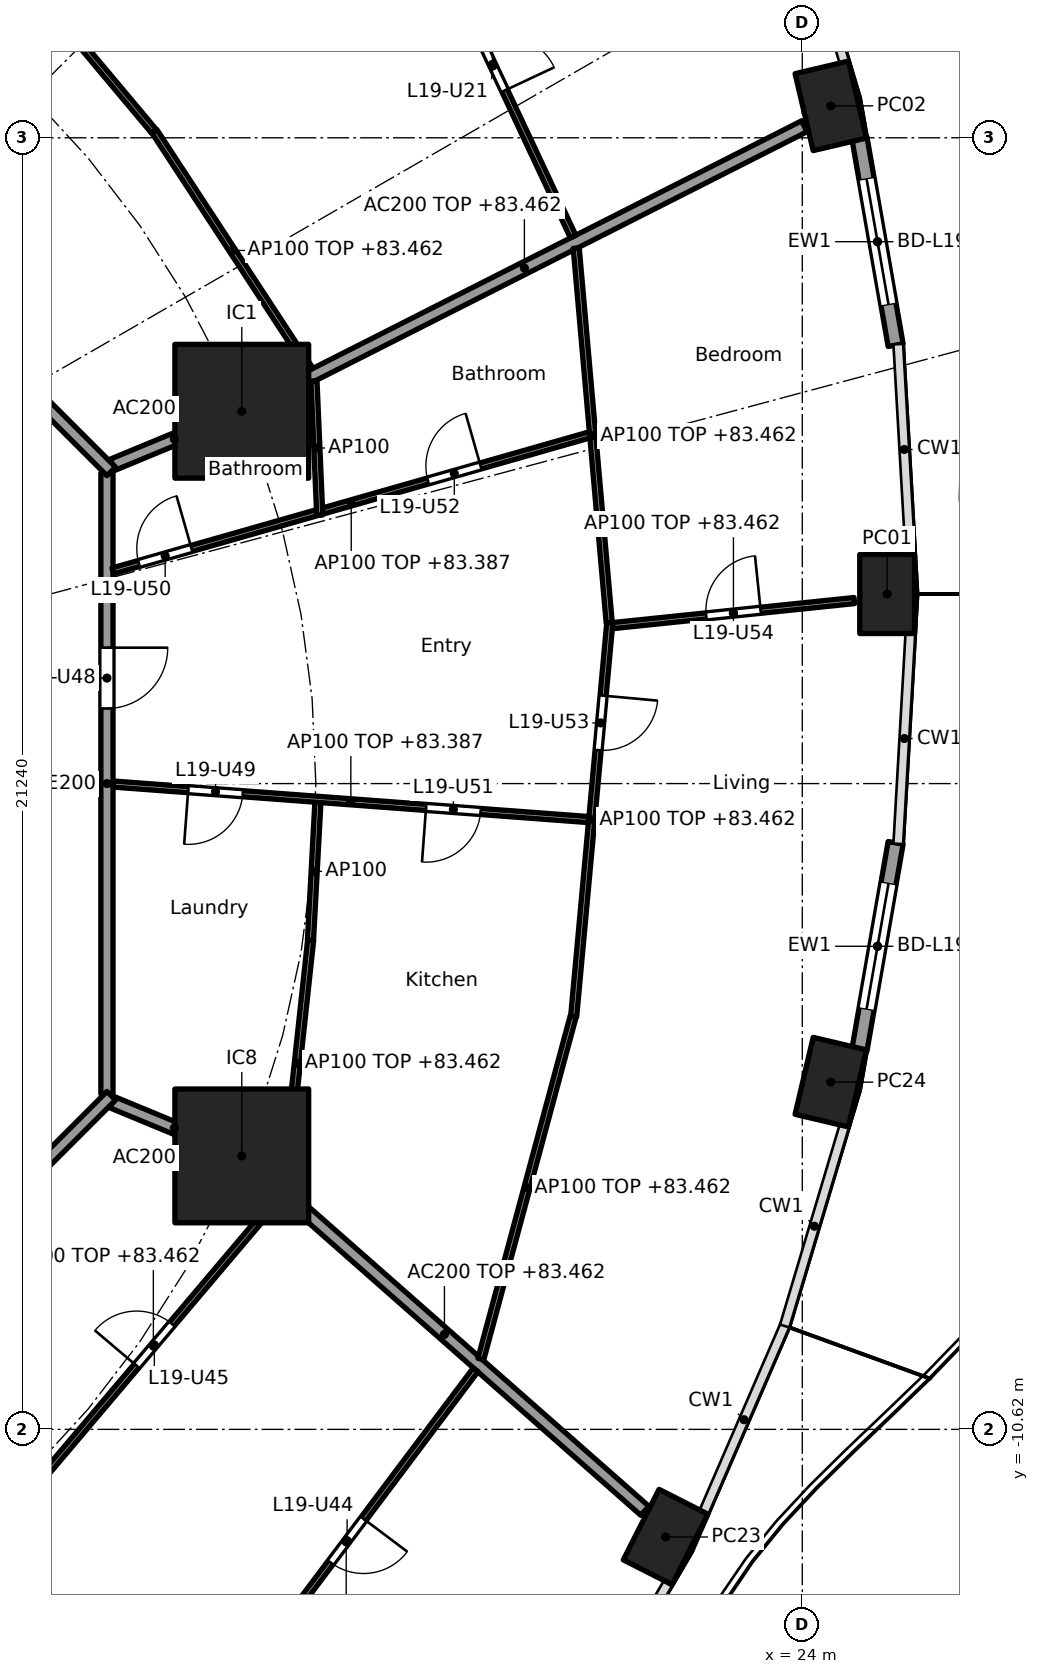
"""IFC4 building model, lengths in metres.
Left out: names, types, materials, properties, quantities, classifications, styles, units other than length and angle.
Written with IfcOpenShell. Run it as: python <this file> out.ifc"""

import sys

from ifc_helpers import new_model, si_unit, direction, frame, frame_2d, origin, origin_2d, place, context, subcontext, project, spatial, rectangle, hollow_rectangle, extrude, element, fill, save


model = new_model("IFC4")
c1 = context("Model", 3, precision=1e-05, world=origin(), true_north=direction((0.0, 1.0)))
c2 = subcontext(c1, "Body", "Model", "MODEL_VIEW")
j1 = project(units=[si_unit("LENGTHUNIT", "METRE"), si_unit("PLANEANGLEUNIT", "RADIAN")], contexts=[c1])
p1 = place(None, origin())
s1 = spatial("IfcSite", under=j1, at=p1, CompositionType="ELEMENT")
p2 = place(p1, origin())
s2 = spatial("IfcBuilding", under=s1, at=p2, CompositionType="ELEMENT")
p3 = place(p2, frame((0.0, 0.0, 80.7)))
s3 = spatial("IfcBuildingStorey", under=s2, at=p3, CompositionType="ELEMENT", Elevation=80.7)
for number, where, z_axis, x_axis in (
    (1, (25.395, 3.118, 0.0), (0.0, 0.0, 1.0), (0.0, 1.0, 0.0)),
    (2, (24.468, 11.145, 0.0), (0.0, 0.0, 1.0), (-0.229, 0.973, 0.0)),
    (3, (21.751, -12.39, 0.0), (0.0, 0.0, 1.0), (0.452, 0.892, 0.0)),
    (4, (24.468, -4.91, 0.0), (0.0, 0.0, 1.0), (0.229, 0.973, 0.0)),
):
    element("IfcColumn", number, at=place(p3, frame(where, z_axis=z_axis, x_axis=x_axis)), inside=s3, PredefinedType="COLUMN", context=c2, shape_type="SweptSolid", body=[
        extrude(hollow_rectangle(XDim=1.3, YDim=0.9, WallThickness=0.045, at=origin_2d()), origin(), (0.0, 0.0, 1.0), 3.7),
    ])
for number, where, z_axis, x_axis in (
    (5, (14.782, 6.123, 0.0), (0.0, 0.0, 1.0), (1.0, 0.0, 0.0)),
    (6, (14.782, -6.123, 0.0), (0.0, 0.0, 1.0), (1.0, 0.0, 0.0)),
):
    element("IfcColumn", number, at=place(p3, frame(where, z_axis=z_axis, x_axis=x_axis)), inside=s3, PredefinedType="COLUMN", context=c2, shape_type="SweptSolid", body=[
        extrude(rectangle(XDim=2.2, YDim=2.2, at=origin_2d()), origin(), (0.0, 0.0, 1.0), 3.7),
    ])
p4 = place(p3, frame((24.94, 10.613, 0.0), z_axis=(0.0, 0.0, 1.0), x_axis=(0.172164316671, -0.985068245385, 0.0)))
e7 = element("IfcWall", 7, at=p4, inside=s3, PredefinedType="SOLIDWALL", context=c2, shape_type="SweptSolid", body=[
    extrude(rectangle(XDim=3.454, YDim=0.25, at=frame_2d((1.727, 0.0))), origin(), (0.0, 0.0, 1.0), 3.44),
])
p5 = place(p4, frame((0.677, 0.0, 0.0)))
e8 = element("IfcOpeningElement", 8, at=p5, cuts=e7, PredefinedType="OPENING", context=c2, shape_type="SweptSolid", body=[
    extrude(rectangle(XDim=2.1, YDim=2.4, at=frame_2d((1.05, 1.2))), frame((0.0, 0.135, 0.0), z_axis=(0.0, -1.0, 0.0), x_axis=(1.0, 0.0, 0.0)), (0.0, 0.0, 1.0), 0.27),
])
p6 = place(p3, frame((25.535, -0.974, 0.0), z_axis=(0.0, 0.0, 1.0), x_axis=(-0.172164316671, -0.985068245385, 0.0)))
e9 = element("IfcWall", 9, at=p6, inside=s3, PredefinedType="SOLIDWALL", context=c2, shape_type="SweptSolid", body=[
    extrude(rectangle(XDim=3.454, YDim=0.25, at=frame_2d((1.727, 0.0))), origin(), (0.0, 0.0, 1.0), 3.44),
])
p7 = place(p6, frame((0.677, 0.0, 0.0)))
e10 = element("IfcOpeningElement", 10, at=p7, cuts=e9, PredefinedType="OPENING", context=c2, shape_type="SweptSolid", body=[
    extrude(rectangle(XDim=2.1, YDim=2.4, at=frame_2d((1.05, 1.2))), frame((0.0, 0.135, 0.0), z_axis=(0.0, -1.0, 0.0), x_axis=(1.0, 0.0, 0.0)), (0.0, 0.0, 1.0), 0.27),
])
p8 = place(p3, frame((12.657, 5.243, 0.0), z_axis=(0.0, 0.0, 1.0), x_axis=(0.923876145736, 0.382691608661, 0.0)))
e11 = element("IfcWall", 11, at=p8, inside=s3, PredefinedType="PARTITIONING", context=c2, shape_type="SweptSolid", body=[
    extrude(rectangle(XDim=2.2, YDim=0.2, at=frame_2d((1.1, 0.0))), origin(), (0.0, 0.0, 1.0), 3.44),
])
p9 = place(p3, frame((14.827, 6.146, 0.0), z_axis=(0.0, 0.0, 1.0), x_axis=(0.892068075337, 0.451901038906, 0.0)))
e12 = element("IfcWall", 12, at=p9, inside=s3, PredefinedType="PARTITIONING", context=c2, shape_type="SweptSolid", body=[
    extrude(rectangle(XDim=10.32, YDim=0.2, at=frame_2d((5.16, 0.0))), origin(), (0.0, 0.0, 1.0), 2.762),
])
p10 = place(p3, frame((12.657, -5.243, 0.0), z_axis=(0.0, 0.0, 1.0), x_axis=(0.923876145736, -0.382691608661, 0.0)))
e13 = element("IfcWall", 13, at=p10, inside=s3, PredefinedType="PARTITIONING", context=c2, shape_type="SweptSolid", body=[
    extrude(rectangle(XDim=2.2, YDim=0.2, at=frame_2d((1.1, 0.0))), origin(), (0.0, 0.0, 1.0), 3.44),
])
p11 = place(p3, frame((14.82, -6.156, 0.0), z_axis=(0.0, 0.0, 1.0), x_axis=(0.750582231659, -0.660777052808, 0.0)))
e14 = element("IfcWall", 14, at=p11, inside=s3, PredefinedType="PARTITIONING", context=c2, shape_type="SweptSolid", body=[
    extrude(rectangle(XDim=8.781, YDim=0.2, at=frame_2d((4.391, 0.0))), origin(), (0.0, 0.0, 1.0), 2.762),
])
p12 = place(p3, frame((12.565, -5.104, 0.0), z_axis=(0.0, 0.0, 1.0), x_axis=(0.0, 1.0, 0.0)))
e15 = element("IfcWall", 15, at=p12, inside=s3, PredefinedType="PARTITIONING", context=c2, shape_type="SweptSolid", body=[
    extrude(rectangle(XDim=10.209, YDim=0.2, at=frame_2d((5.104, 0.0))), origin(), (0.0, 0.0, 1.0), 3.44),
])
p13 = place(p12, frame((6.339, 0.0, 0.0)))
e16 = element("IfcOpeningElement", 16, at=p13, cuts=e15, PredefinedType="OPENING", context=c2, shape_type="SweptSolid", body=[
    extrude(rectangle(XDim=1.0, YDim=2.1, at=frame_2d((0.5, 1.05))), frame((0.0, 0.11, 0.0), z_axis=(0.0, -1.0, 0.0), x_axis=(1.0, 0.0, 0.0)), (0.0, 0.0, 1.0), 0.22),
])
p14 = place(p3, frame((12.635, 5.134, 0.0), z_axis=(0.0, 0.0, 1.0), x_axis=(-0.707106781187, 0.707106781187, 0.0)))
e17 = element("IfcWall", 17, at=p14, inside=s3, PredefinedType="PARTITIONING", context=c2, shape_type="SweptSolid", body=[
    extrude(rectangle(XDim=10.609, YDim=0.2, at=frame_2d((5.305, 0.0))), origin(), (0.0, 0.0, 1.0), 3.44),
])
p15 = place(p3, frame((5.275, -12.494, 0.0), z_axis=(0.0, 0.0, 1.0), x_axis=(0.707106781187, 0.707106781187, 0.0)))
e18 = element("IfcWall", 18, at=p15, inside=s3, PredefinedType="PARTITIONING", context=c2, shape_type="SweptSolid", body=[
    extrude(rectangle(XDim=10.409, YDim=0.2, at=frame_2d((5.205, 0.0))), origin(), (0.0, 0.0, 1.0), 3.44),
])
p16 = place(p3, frame((20.879, 2.597, 0.0), z_axis=(0.0, 0.0, 1.0), x_axis=(0.994666546694, 0.103142914868, 0.0)))
e19 = element("IfcWall", 19, at=p16, inside=s3, PredefinedType="PARTITIONING", context=c2, shape_type="SweptSolid", body=[
    extrude(rectangle(XDim=3.998, YDim=0.1, at=frame_2d((1.999, 0.0))), origin(), (0.0, 0.0, 1.0), 2.762),
])
p17 = place(p16, frame((1.549, 0.0, 0.0)))
e20 = element("IfcOpeningElement", 20, at=p17, cuts=e19, PredefinedType="OPENING", context=c2, shape_type="SweptSolid", body=[
    extrude(rectangle(XDim=0.9, YDim=2.1, at=frame_2d((0.45, 1.05))), frame((0.0, 0.06, 0.0), z_axis=(0.0, -1.0, 0.0), x_axis=(1.0, 0.0, 0.0)), (0.0, 0.0, 1.0), 0.12),
])
p18 = place(p3, frame((20.825, 2.642, 0.0), z_axis=(0.0, 0.0, 1.0), x_axis=(-0.087760219522, 0.996141628419, 0.0)))
e21 = element("IfcWall", 21, at=p18, inside=s3, PredefinedType="PARTITIONING", context=c2, shape_type="SweptSolid", body=[
    extrude(rectangle(XDim=6.187, YDim=0.1, at=frame_2d((3.094, 0.0))), origin(), (0.0, 0.0, 1.0), 2.762),
])
p19 = place(p3, frame((20.834, 2.642, 0.0), z_axis=(0.0, 0.0, 1.0), x_axis=(-0.091385407685, -0.995815599025, 0.0)))
e22 = element("IfcWall", 22, at=p19, inside=s3, PredefinedType="PARTITIONING", context=c2, shape_type="SweptSolid", body=[
    extrude(rectangle(XDim=6.502, YDim=0.1, at=frame_2d((3.251, 0.0))), origin(), (0.0, 0.0, 1.0), 2.762),
])
p20 = place(p19, frame((1.201, 0.0, 0.0)))
e23 = element("IfcOpeningElement", 23, at=p20, cuts=e22, PredefinedType="OPENING", context=c2, shape_type="SweptSolid", body=[
    extrude(rectangle(XDim=0.9, YDim=2.1, at=frame_2d((0.45, 1.05))), frame((0.0, 0.06, 0.0), z_axis=(0.0, -1.0, 0.0), x_axis=(1.0, 0.0, 0.0)), (0.0, 0.0, 1.0), 0.12),
])
p21 = place(p3, frame((12.661, 3.497, 0.0), z_axis=(0.0, 0.0, 1.0), x_axis=(0.961626678623, 0.274361314621, 0.0)))
e24 = element("IfcWall", 24, at=p21, inside=s3, PredefinedType="PARTITIONING", context=c2, shape_type="SweptSolid", body=[
    extrude(rectangle(XDim=8.156, YDim=0.1, at=frame_2d((4.078, 0.0))), origin(), (0.0, 0.0, 1.0), 2.687),
])
p22 = place(p21, frame((0.446, 0.0, 0.0)))
e25 = element("IfcOpeningElement", 25, at=p22, cuts=e24, PredefinedType="OPENING", context=c2, shape_type="SweptSolid", body=[
    extrude(rectangle(XDim=0.9, YDim=2.1, at=frame_2d((0.45, 1.05))), frame((0.0, 0.06, 0.0), z_axis=(0.0, -1.0, 0.0), x_axis=(1.0, 0.0, 0.0)), (0.0, 0.0, 1.0), 0.12),
])
p23 = place(p21, frame((5.39, 0.0, 0.0)))
e26 = element("IfcOpeningElement", 26, at=p23, cuts=e24, PredefinedType="OPENING", context=c2, shape_type="SweptSolid", body=[
    extrude(rectangle(XDim=0.9, YDim=2.1, at=frame_2d((0.45, 1.05))), frame((0.0, 0.06, 0.0), z_axis=(0.0, -1.0, 0.0), x_axis=(1.0, 0.0, 0.0)), (0.0, 0.0, 1.0), 0.12),
])
p24 = place(p3, frame((16.064, 4.415, 0.0), z_axis=(0.0, 0.0, 1.0), x_axis=(-0.043101501373, 0.999070698489, 0.0)))
e27 = element("IfcWall", 27, at=p24, inside=s3, PredefinedType="PARTITIONING", context=c2, shape_type="SweptSolid", body=[
    extrude(rectangle(XDim=2.209, YDim=0.1, at=frame_2d((1.104, 0.0))), origin(), (0.0, 0.0, 1.0), 3.44),
])
p25 = place(p3, frame((15.91, 6.806, 0.0), z_axis=(0.0, 0.0, 1.0), x_axis=(-0.547468243486, 0.836826458936, 0.0)))
e28 = element("IfcWall", 28, at=p25, inside=s3, PredefinedType="PARTITIONING", context=c2, shape_type="SweptSolid", body=[
    extrude(rectangle(XDim=4.688, YDim=0.1, at=frame_2d((2.344, 0.0))), origin(), (0.0, 0.0, 1.0), 2.762),
])
p26 = place(p3, frame((20.231, 8.995, 0.0), z_axis=(0.0, 0.0, 1.0), x_axis=(-0.424587886407, 0.905386727712, 0.0)))
e29 = element("IfcWall", 29, at=p26, inside=s3, PredefinedType="PARTITIONING", context=c2, shape_type="SweptSolid", body=[
    extrude(rectangle(XDim=6.254, YDim=0.1, at=frame_2d((3.127, 0.0))), origin(), (0.0, 0.0, 1.0), 2.762),
])
p27 = place(p26, frame((2.652, 0.0, 0.0)))
e30 = element("IfcOpeningElement", 30, at=p27, cuts=e29, PredefinedType="OPENING", context=c2, shape_type="SweptSolid", body=[
    extrude(rectangle(XDim=0.9, YDim=2.1, at=frame_2d((0.45, 1.05))), frame((0.0, 0.06, 0.0), z_axis=(0.0, -1.0, 0.0), x_axis=(1.0, 0.0, 0.0)), (0.0, 0.0, 1.0), 0.12),
])
p28 = place(p3, frame((13.339, 10.725, 0.0), z_axis=(0.0, 0.0, 1.0), x_axis=(-0.642515455924, 0.766272724882, 0.0)))
e31 = element("IfcWall", 31, at=p28, inside=s3, PredefinedType="PARTITIONING", context=c2, shape_type="SweptSolid", body=[
    extrude(rectangle(XDim=4.537, YDim=0.1, at=frame_2d((2.269, 0.0))), origin(), (0.0, 0.0, 1.0), 2.762),
])
p29 = place(p3, frame((7.713, 10.195, 0.0), z_axis=(0.0, 0.0, 1.0), x_axis=(0.552111071171, 0.833770571015, 0.0)))
e32 = element("IfcWall", 32, at=p29, inside=s3, PredefinedType="PARTITIONING", context=c2, shape_type="SweptSolid", body=[
    extrude(rectangle(XDim=17.208, YDim=0.1, at=frame_2d((8.604, 0.0))), origin(), (0.0, 0.0, 1.0), 2.687),
])
p30 = place(p29, frame((1.976, 0.0, 0.0)))
e33 = element("IfcOpeningElement", 33, at=p30, cuts=e32, PredefinedType="OPENING", context=c2, shape_type="SweptSolid", body=[
    extrude(rectangle(XDim=0.9, YDim=2.1, at=frame_2d((0.45, 1.05))), frame((0.0, 0.06, 0.0), z_axis=(0.0, -1.0, 0.0), x_axis=(1.0, 0.0, 0.0)), (0.0, 0.0, 1.0), 0.12),
])
p31 = place(p29, frame((7.611, 0.0, 0.0)))
e34 = element("IfcOpeningElement", 34, at=p31, cuts=e32, PredefinedType="OPENING", context=c2, shape_type="SweptSolid", body=[
    extrude(rectangle(XDim=0.9, YDim=2.1, at=frame_2d((0.45, 1.05))), frame((0.0, 0.06, 0.0), z_axis=(0.0, -1.0, 0.0), x_axis=(1.0, 0.0, 0.0)), (0.0, 0.0, 1.0), 0.12),
])
p32 = place(p3, frame((11.255, -11.699, 0.0), z_axis=(0.0, 0.0, 1.0), x_axis=(0.646107653745, 0.763246290375, 0.0)))
e35 = element("IfcWall", 35, at=p32, inside=s3, PredefinedType="PARTITIONING", context=c2, shape_type="SweptSolid", body=[
    extrude(rectangle(XDim=6.417, YDim=0.1, at=frame_2d((3.208, 0.0))), origin(), (0.0, 0.0, 1.0), 2.762),
])
p33 = place(p32, frame((2.784, 0.0, 0.0)))
e36 = element("IfcOpeningElement", 36, at=p33, cuts=e35, PredefinedType="OPENING", context=c2, shape_type="SweptSolid", body=[
    extrude(rectangle(XDim=0.9, YDim=2.1, at=frame_2d((0.45, 1.05))), frame((0.0, 0.06, 0.0), z_axis=(0.0, -1.0, 0.0), x_axis=(1.0, 0.0, 0.0)), (0.0, 0.0, 1.0), 0.12),
])
p34 = place(p3, frame((14.372, -15.3, 0.0), z_axis=(0.0, 0.0, 1.0), x_axis=(0.600987107857, 0.79925871668, 0.0)))
e37 = element("IfcWall", 37, at=p34, inside=s3, PredefinedType="PARTITIONING", context=c2, shape_type="SweptSolid", body=[
    extrude(rectangle(XDim=7.08, YDim=0.1, at=frame_2d((3.54, 0.0))), origin(), (0.0, 0.0, 1.0), 2.762),
])
p35 = place(p34, frame((3.115, 0.0, 0.0)))
e38 = element("IfcOpeningElement", 38, at=p35, cuts=e37, PredefinedType="OPENING", context=c2, shape_type="SweptSolid", body=[
    extrude(rectangle(XDim=0.9, YDim=2.1, at=frame_2d((0.45, 1.05))), frame((0.0, 0.06, 0.0), z_axis=(0.0, -1.0, 0.0), x_axis=(1.0, 0.0, 0.0)), (0.0, 0.0, 1.0), 0.12),
])
p36 = place(p3, frame((15.477, -6.625, 0.0), z_axis=(0.0, 0.0, 1.0), x_axis=(0.107561928907, 0.994198386365, 0.0)))
e39 = element("IfcWall", 39, at=p36, inside=s3, PredefinedType="PARTITIONING", context=c2, shape_type="SweptSolid", body=[
    extrude(rectangle(XDim=4.072, YDim=0.1, at=frame_2d((2.036, 0.0))), origin(), (0.0, 0.0, 1.0), 2.762),
])
p37 = place(p3, frame((18.713, -9.464, 0.0), z_axis=(0.0, 0.0, 1.0), x_axis=(0.260279646259, 0.965533275316, 0.0)))
e40 = element("IfcWall", 40, at=p37, inside=s3, PredefinedType="PARTITIONING", context=c2, shape_type="SweptSolid", body=[
    extrude(rectangle(XDim=5.833, YDim=0.1, at=frame_2d((2.917, 0.0))), origin(), (0.0, 0.0, 1.0), 2.762),
])
p38 = place(p3, frame((15.912, -2.577, 0.0), z_axis=(0.0, 0.0, 1.0), x_axis=(0.053749298185, 0.998554461682, 0.0)))
e41 = element("IfcWall", 41, at=p38, inside=s3, PredefinedType="PARTITIONING", context=c2, shape_type="SweptSolid", body=[
    extrude(rectangle(XDim=2.271, YDim=0.1, at=frame_2d((1.135, 0.0))), origin(), (0.0, 0.0, 1.0), 3.44),
])
p39 = place(p3, frame((12.665, -0.008, 0.0), z_axis=(0.0, 0.0, 1.0), x_axis=(0.997222647159, -0.074478130978, 0.0)))
e42 = element("IfcWall", 42, at=p39, inside=s3, PredefinedType="PARTITIONING", context=c2, shape_type="SweptSolid", body=[
    extrude(rectangle(XDim=7.844, YDim=0.1, at=frame_2d((3.922, 0.0))), origin(), (0.0, 0.0, 1.0), 2.687),
])
p40 = place(p39, frame((1.241, 0.0, 0.0)))
e43 = element("IfcOpeningElement", 43, at=p40, cuts=e42, PredefinedType="OPENING", context=c2, shape_type="SweptSolid", body=[
    extrude(rectangle(XDim=0.9, YDim=2.1, at=frame_2d((0.45, 1.05))), frame((0.0, 0.06, 0.0), z_axis=(0.0, -1.0, 0.0), x_axis=(1.0, 0.0, 0.0)), (0.0, 0.0, 1.0), 0.12),
])
p41 = place(p39, frame((5.163, 0.0, 0.0)))
e44 = element("IfcOpeningElement", 44, at=p41, cuts=e42, PredefinedType="OPENING", context=c2, shape_type="SweptSolid", body=[
    extrude(rectangle(XDim=0.9, YDim=2.1, at=frame_2d((0.45, 1.05))), frame((0.0, 0.06, 0.0), z_axis=(0.0, -1.0, 0.0), x_axis=(1.0, 0.0, 0.0)), (0.0, 0.0, 1.0), 0.12),
])
p42 = place(p5, origin())
e45 = element("IfcDoor", 45, at=p42, inside=s3, OperationType="SLIDING_TO_LEFT", PredefinedType="DOOR", context=c2, shape_type="SweptSolid", body=[
    extrude(rectangle(XDim=2.1, YDim=2.4, at=frame_2d((1.05, 1.2))), frame((0.0, 0.025, 0.0), z_axis=(0.0, -1.0, 0.0), x_axis=(1.0, 0.0, 0.0)), (0.0, 0.0, 1.0), 0.05),
])
fill(e8, e45)
p43 = place(p7, origin())
e46 = element("IfcDoor", 46, at=p43, inside=s3, OperationType="SLIDING_TO_LEFT", PredefinedType="DOOR", context=c2, shape_type="SweptSolid", body=[
    extrude(rectangle(XDim=2.1, YDim=2.4, at=frame_2d((1.05, 1.2))), frame((0.0, 0.025, 0.0), z_axis=(0.0, -1.0, 0.0), x_axis=(1.0, 0.0, 0.0)), (0.0, 0.0, 1.0), 0.05),
])
fill(e10, e46)
p44 = place(p27, frame((0.9, 0.0, 0.0), x_axis=(-1.0, 0.0, 0.0)))
e47 = element("IfcDoor", 47, at=p44, inside=s3, OperationType="SINGLE_SWING_RIGHT", PredefinedType="DOOR", context=c2, shape_type="SweptSolid", body=[
    extrude(rectangle(XDim=0.9, YDim=2.1, at=frame_2d((0.45, 1.05))), frame((0.0, 0.025, 0.0), z_axis=(0.0, -1.0, 0.0), x_axis=(1.0, 0.0, 0.0)), (0.0, 0.0, 1.0), 0.05),
])
fill(e30, e47)
p45 = place(p35, frame((0.9, 0.0, 0.0), x_axis=(-1.0, 0.0, 0.0)))
e48 = element("IfcDoor", 48, at=p45, inside=s3, OperationType="SINGLE_SWING_LEFT", PredefinedType="DOOR", context=c2, shape_type="SweptSolid", body=[
    extrude(rectangle(XDim=0.9, YDim=2.1, at=frame_2d((0.45, 1.05))), frame((0.0, 0.025, 0.0), z_axis=(0.0, -1.0, 0.0), x_axis=(1.0, 0.0, 0.0)), (0.0, 0.0, 1.0), 0.05),
])
fill(e38, e48)
p46 = place(p33, origin())
e49 = element("IfcDoor", 49, at=p46, inside=s3, OperationType="SINGLE_SWING_LEFT", PredefinedType="DOOR", context=c2, shape_type="SweptSolid", body=[
    extrude(rectangle(XDim=0.9, YDim=2.1, at=frame_2d((0.45, 1.05))), frame((0.0, 0.025, 0.0), z_axis=(0.0, -1.0, 0.0), x_axis=(1.0, 0.0, 0.0)), (0.0, 0.0, 1.0), 0.05),
])
fill(e36, e49)
p47 = place(p13, frame((1.0, 0.0, 0.0), x_axis=(-1.0, 0.0, 0.0)))
e50 = element("IfcDoor", 50, at=p47, inside=s3, OperationType="SINGLE_SWING_LEFT", PredefinedType="DOOR", context=c2, shape_type="SweptSolid", body=[
    extrude(rectangle(XDim=1.0, YDim=2.1, at=frame_2d((0.5, 1.05))), frame((0.0, 0.025, 0.0), z_axis=(0.0, -1.0, 0.0), x_axis=(1.0, 0.0, 0.0)), (0.0, 0.0, 1.0), 0.05),
])
fill(e16, e50)
p48 = place(p40, frame((0.9, 0.0, 0.0), x_axis=(-1.0, 0.0, 0.0)))
e51 = element("IfcDoor", 51, at=p48, inside=s3, OperationType="SINGLE_SWING_RIGHT", PredefinedType="DOOR", context=c2, shape_type="SweptSolid", body=[
    extrude(rectangle(XDim=0.9, YDim=2.1, at=frame_2d((0.45, 1.05))), frame((0.0, 0.025, 0.0), z_axis=(0.0, -1.0, 0.0), x_axis=(1.0, 0.0, 0.0)), (0.0, 0.0, 1.0), 0.05),
])
fill(e43, e51)
p49 = place(p22, origin())
e52 = element("IfcDoor", 52, at=p49, inside=s3, OperationType="SINGLE_SWING_RIGHT", PredefinedType="DOOR", context=c2, shape_type="SweptSolid", body=[
    extrude(rectangle(XDim=0.9, YDim=2.1, at=frame_2d((0.45, 1.05))), frame((0.0, 0.025, 0.0), z_axis=(0.0, -1.0, 0.0), x_axis=(1.0, 0.0, 0.0)), (0.0, 0.0, 1.0), 0.05),
])
fill(e25, e52)
p50 = place(p41, frame((0.9, 0.0, 0.0), x_axis=(-1.0, 0.0, 0.0)))
e53 = element("IfcDoor", 53, at=p50, inside=s3, OperationType="SINGLE_SWING_RIGHT", PredefinedType="DOOR", context=c2, shape_type="SweptSolid", body=[
    extrude(rectangle(XDim=0.9, YDim=2.1, at=frame_2d((0.45, 1.05))), frame((0.0, 0.025, 0.0), z_axis=(0.0, -1.0, 0.0), x_axis=(1.0, 0.0, 0.0)), (0.0, 0.0, 1.0), 0.05),
])
fill(e44, e53)
p51 = place(p23, origin())
e54 = element("IfcDoor", 54, at=p51, inside=s3, OperationType="SINGLE_SWING_RIGHT", PredefinedType="DOOR", context=c2, shape_type="SweptSolid", body=[
    extrude(rectangle(XDim=0.9, YDim=2.1, at=frame_2d((0.45, 1.05))), frame((0.0, 0.025, 0.0), z_axis=(0.0, -1.0, 0.0), x_axis=(1.0, 0.0, 0.0)), (0.0, 0.0, 1.0), 0.05),
])
fill(e26, e54)
p52 = place(p20, origin())
e55 = element("IfcDoor", 55, at=p52, inside=s3, OperationType="SINGLE_SWING_LEFT", PredefinedType="DOOR", context=c2, shape_type="SweptSolid", body=[
    extrude(rectangle(XDim=0.9, YDim=2.1, at=frame_2d((0.45, 1.05))), frame((0.0, 0.025, 0.0), z_axis=(0.0, -1.0, 0.0), x_axis=(1.0, 0.0, 0.0)), (0.0, 0.0, 1.0), 0.05),
])
fill(e23, e55)
p53 = place(p17, origin())
e56 = element("IfcDoor", 56, at=p53, inside=s3, OperationType="SINGLE_SWING_RIGHT", PredefinedType="DOOR", context=c2, shape_type="SweptSolid", body=[
    extrude(rectangle(XDim=0.9, YDim=2.1, at=frame_2d((0.45, 1.05))), frame((0.0, 0.025, 0.0), z_axis=(0.0, -1.0, 0.0), x_axis=(1.0, 0.0, 0.0)), (0.0, 0.0, 1.0), 0.05),
])
fill(e20, e56)
save(model, sys.argv[1])
